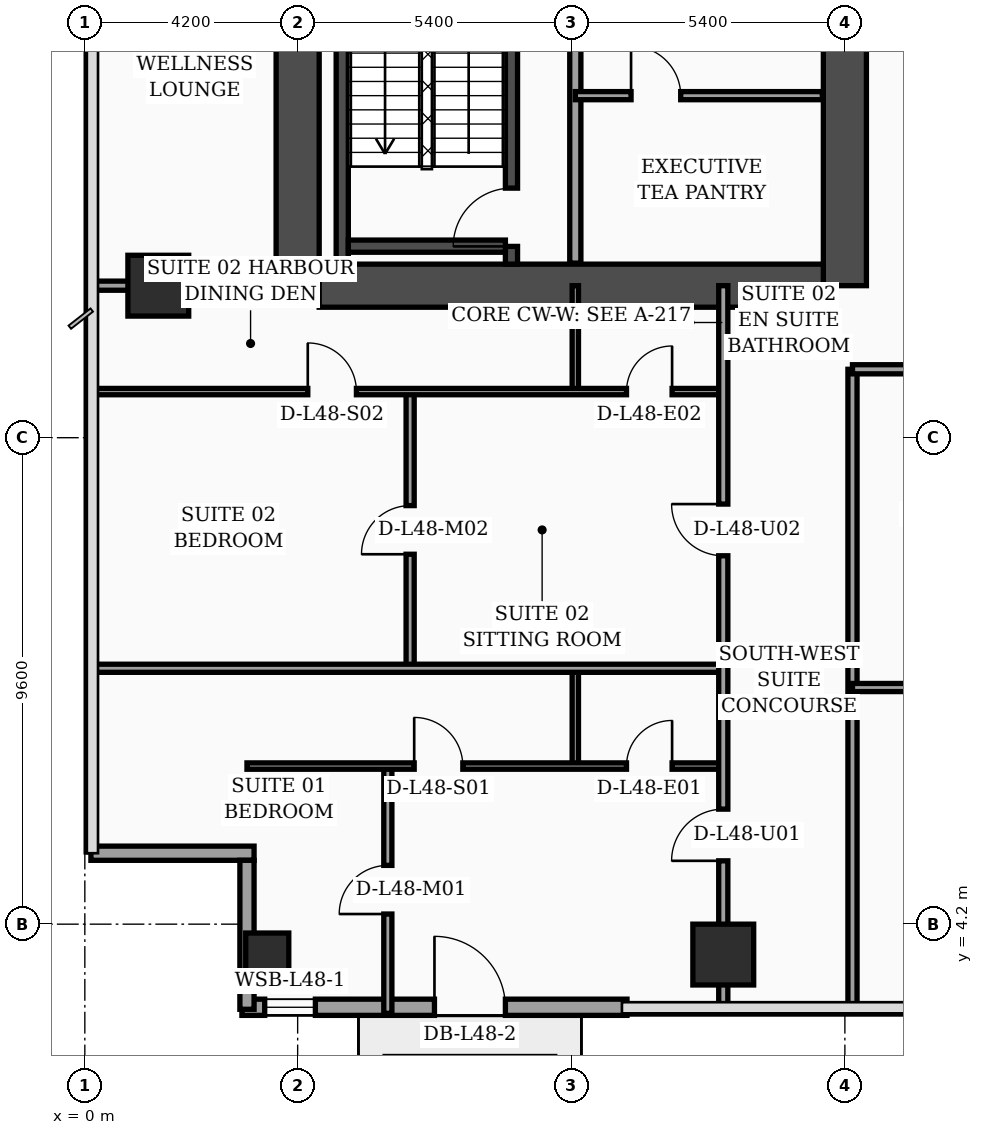
"""IFC4 building model, lengths in metres.
Left out: names, types, materials, properties, quantities, classifications, styles, units other than length and angle.
Written with IfcOpenShell. Run it as: python <this file> out.ifc"""

import sys

from ifc_helpers import new_model, si_unit, direction, frame, frame_2d, origin, origin_2d, place, context, subcontext, project, spatial, rectangle, hollow_rectangle, extrude, element, fill, save


model = new_model("IFC4")
c1 = context("Model", 3, precision=1e-05, world=origin(), true_north=direction((0.0, 1.0)))
c2 = subcontext(c1, "Body", "Model", "MODEL_VIEW")
j1 = project(units=[si_unit("LENGTHUNIT", "METRE"), si_unit("PLANEANGLEUNIT", "RADIAN")], contexts=[c1])
p1 = place(None, origin())
s1 = spatial("IfcSite", under=j1, at=p1, CompositionType="ELEMENT")
p2 = place(p1, origin())
s2 = spatial("IfcBuilding", under=s1, at=p2, CompositionType="ELEMENT")
p3 = place(p2, frame((0.0, 0.0, 195.1)))
s3 = spatial("IfcBuildingStorey", under=s2, at=p3, CompositionType="ELEMENT", Elevation=195.1)
p4 = place(p3, frame((4.2, 16.8, 0.0), z_axis=(0.0, 0.0, 1.0), x_axis=(0.0, 1.0, 0.0)))
e1 = element("IfcWall", 1, at=p4, inside=s3, PredefinedType="SHEAR", context=c2, shape_type="SweptSolid", body=[
    extrude(rectangle(XDim=21.6, YDim=0.85, at=frame_2d((10.8, 0.0))), origin(), (0.0, 0.0, 1.0), 4.05),
])
p5 = place(p3, frame((15.0, 16.8, 0.0), z_axis=(0.0, 0.0, 1.0), x_axis=(0.0, 1.0, 0.0)))
e2 = element("IfcWall", 2, at=p5, inside=s3, PredefinedType="SHEAR", context=c2, shape_type="SweptSolid", body=[
    extrude(rectangle(XDim=21.6, YDim=0.85, at=frame_2d((10.8, 0.0))), origin(), (0.0, 0.0, 1.0), 4.05),
])
p6 = place(p5, frame((8.65, 0.0, 0.0)))
e3 = element("IfcOpeningElement", 3, at=p6, cuts=e2, PredefinedType="OPENING", context=c2, shape_type="SweptSolid", body=[
    extrude(rectangle(XDim=1.1, YDim=2.2, at=frame_2d((0.55, 1.1))), frame((0.0, 0.435, 0.0), z_axis=(0.0, -1.0, 0.0), x_axis=(1.0, 0.0, 0.0)), (0.0, 0.0, 1.0), 0.87),
])
p7 = place(p5, frame((10.85, 0.0, 0.0)))
e4 = element("IfcOpeningElement", 4, at=p7, cuts=e2, PredefinedType="OPENING", context=c2, shape_type="SweptSolid", body=[
    extrude(rectangle(XDim=1.1, YDim=2.2, at=frame_2d((0.55, 1.1))), frame((0.0, 0.435, 0.0), z_axis=(0.0, -1.0, 0.0), x_axis=(1.0, 0.0, 0.0)), (0.0, 0.0, 1.0), 0.87),
])
p8 = place(p5, frame((13.5, 0.0, 0.0)))
e5 = element("IfcOpeningElement", 5, at=p8, cuts=e2, PredefinedType="OPENING", context=c2, shape_type="SweptSolid", body=[
    extrude(rectangle(XDim=1.1, YDim=2.2, at=frame_2d((0.55, 1.1))), frame((0.0, 0.435, 0.0), z_axis=(0.0, -1.0, 0.0), x_axis=(1.0, 0.0, 0.0)), (0.0, 0.0, 1.0), 0.87),
])
p9 = place(p5, frame((16.15, 0.0, 0.0)))
e6 = element("IfcOpeningElement", 6, at=p9, cuts=e2, PredefinedType="OPENING", context=c2, shape_type="SweptSolid", body=[
    extrude(rectangle(XDim=1.1, YDim=2.2, at=frame_2d((0.55, 1.1))), frame((0.0, 0.435, 0.0), z_axis=(0.0, -1.0, 0.0), x_axis=(1.0, 0.0, 0.0)), (0.0, 0.0, 1.0), 0.87),
])
p10 = place(p3, frame((4.625, 16.8, 0.0), z_axis=(0.0, 0.0, 1.0), x_axis=(1.0, 0.0, 0.0)))
e7 = element("IfcWall", 7, at=p10, inside=s3, PredefinedType="SHEAR", context=c2, shape_type="SweptSolid", body=[
    extrude(rectangle(XDim=9.95, YDim=0.85, at=frame_2d((4.975, 0.0))), origin(), (0.0, 0.0, 1.0), 4.05),
])
p11 = place(p3, frame((5.08, 17.225, 0.0), z_axis=(0.0, 0.0, 1.0), x_axis=(0.0, 1.0, 0.0)))
e8 = element("IfcWall", 8, at=p11, inside=s3, PredefinedType="SOLIDWALL", context=c2, shape_type="SweptSolid", body=[
    extrude(rectangle(XDim=9.565, YDim=0.24, at=frame_2d((4.782, 0.0))), origin(), (0.0, 0.0, 1.0), 4.05),
])
p12 = place(p3, frame((8.42, 17.225, 0.0), z_axis=(0.0, 0.0, 1.0), x_axis=(0.0, 1.0, 0.0)))
e9 = element("IfcWall", 9, at=p12, inside=s3, PredefinedType="SOLIDWALL", context=c2, shape_type="SweptSolid", body=[
    extrude(rectangle(XDim=9.565, YDim=0.24, at=frame_2d((4.782, 0.0))), origin(), (0.0, 0.0, 1.0), 4.05),
])
p13 = place(p12, frame((0.35, 0.0, 0.0)))
e10 = element("IfcOpeningElement", 10, at=p13, cuts=e9, PredefinedType="OPENING", context=c2, shape_type="SweptSolid", body=[
    extrude(rectangle(XDim=1.15, YDim=2.2, at=frame_2d((0.575, 1.1))), frame((0.0, 0.13, 0.0), z_axis=(0.0, -1.0, 0.0), x_axis=(1.0, 0.0, 0.0)), (0.0, 0.0, 1.0), 0.26),
])
p14 = place(p3, frame((5.2, 17.58, 0.0), z_axis=(0.0, 0.0, 1.0), x_axis=(1.0, 0.0, 0.0)))
e11 = element("IfcWall", 11, at=p14, inside=s3, PredefinedType="SOLIDWALL", context=c2, shape_type="SweptSolid", body=[
    extrude(rectangle(XDim=3.1, YDim=0.24, at=frame_2d((1.55, 0.0))), origin(), (0.0, 0.0, 1.0), 4.05),
])
p15 = place(p3, frame((3.6, 3.6, 0.0), z_axis=(0.0, 0.0, 1.0), x_axis=(1.0, 0.0, 0.0)))
e12 = element("IfcColumn", 12, at=p15, inside=s3, PredefinedType="COLUMN", context=c2, shape_type="SweptSolid", body=[
    extrude(hollow_rectangle(XDim=0.85, YDim=0.85, WallThickness=0.036, at=origin_2d()), origin(), (0.0, 0.0, 1.0), 4.05),
])
for number, where, z_axis, x_axis in (
    (13, (1.45, 16.8, 0.0), (0.0, 0.0, 1.0), (1.0, 0.0, 0.0)),
    (14, (12.6, 3.6, 0.0), (0.0, 0.0, 1.0), (1.0, 0.0, 0.0)),
):
    element("IfcColumn", number, at=place(p3, frame(where, z_axis=z_axis, x_axis=x_axis)), inside=s3, PredefinedType="COLUMN", context=c2, shape_type="SweptSolid", body=[
        extrude(rectangle(XDim=1.2, YDim=1.2, at=origin_2d()), origin(), (0.0, 0.0, 1.0), 4.05),
    ])
p16 = place(p3, frame((3.1, 2.56, 0.0), z_axis=(0.0, 0.0, 1.0), x_axis=(1.0, 0.0, 0.0)))
e15 = element("IfcWall", 15, at=p16, inside=s3, PredefinedType="SOLIDWALL", context=c2, shape_type="SweptSolid", body=[
    extrude(rectangle(XDim=7.6, YDim=0.32, at=frame_2d((3.8, 0.0))), origin(), (0.0, 0.0, 1.0), 4.05),
])
p17 = place(p16, frame((0.45, 0.0, 0.75)))
e16 = element("IfcOpeningElement", 16, at=p17, cuts=e15, PredefinedType="OPENING", context=c2, shape_type="SweptSolid", body=[
    extrude(rectangle(XDim=1.0, YDim=1.6, at=frame_2d((0.5, 0.8))), frame((0.0, 0.17, 0.0), z_axis=(0.0, -1.0, 0.0), x_axis=(1.0, 0.0, 0.0)), (0.0, 0.0, 1.0), 0.34),
])
p18 = place(p16, frame((3.8, 0.0, 0.0)))
e17 = element("IfcOpeningElement", 17, at=p18, cuts=e15, PredefinedType="OPENING", context=c2, shape_type="SweptSolid", body=[
    extrude(rectangle(XDim=1.4, YDim=2.25, at=frame_2d((0.7, 1.125))), frame((0.0, 0.17, 0.0), z_axis=(0.0, -1.0, 0.0), x_axis=(1.0, 0.0, 0.0)), (0.0, 0.0, 1.0), 0.34),
])
p19 = place(p3, frame((0.12, 5.6, 0.0), z_axis=(0.0, 0.0, 1.0), x_axis=(1.0, 0.0, 0.0)))
e18 = element("IfcWall", 18, at=p19, inside=s3, PredefinedType="SOLIDWALL", context=c2, shape_type="SweptSolid", body=[
    extrude(rectangle(XDim=3.22, YDim=0.28, at=frame_2d((1.61, 0.0))), origin(), (0.0, 0.0, 1.0), 3.45),
])
p20 = place(p3, frame((3.2, 5.46, 0.0), z_axis=(0.0, 0.0, 1.0), x_axis=(0.0, -1.0, 0.0)))
e19 = element("IfcWall", 19, at=p20, inside=s3, PredefinedType="SOLIDWALL", context=c2, shape_type="SweptSolid", body=[
    extrude(rectangle(XDim=2.94, YDim=0.28, at=frame_2d((1.47, 0.0))), origin(), (0.0, 0.0, 1.0), 2.35),
])
p21 = place(p3, frame((9.68, 17.245, 0.0), z_axis=(0.0, 0.0, 1.0), x_axis=(0.0, 1.0, 0.0)))
e20 = element("IfcWall", 20, at=p21, inside=s3, PredefinedType="SOLIDWALL", context=c2, shape_type="SweptSolid", body=[
    extrude(rectangle(XDim=7.755, YDim=0.22, at=frame_2d((3.877, 0.0))), origin(), (0.0, 0.0, 1.0), 4.05),
])
p22 = place(p3, frame((9.68, 20.55, 0.0), z_axis=(0.0, 0.0, 1.0), x_axis=(1.0, 0.0, 0.0)))
e21 = element("IfcWall", 21, at=p22, inside=s3, PredefinedType="PARTITIONING", context=c2, shape_type="SweptSolid", body=[
    extrude(rectangle(XDim=4.875, YDim=0.16, at=frame_2d((2.438, 0.0))), origin(), (0.0, 0.0, 1.0), 4.05),
])
p23 = place(p22, frame((1.1, 0.0, 0.0)))
e22 = element("IfcOpeningElement", 22, at=p23, cuts=e21, PredefinedType="OPENING", context=c2, shape_type="SweptSolid", body=[
    extrude(rectangle(XDim=0.98, YDim=2.15, at=frame_2d((0.49, 1.075))), frame((0.0, 0.09, 0.0), z_axis=(0.0, -1.0, 0.0), x_axis=(1.0, 0.0, 0.0)), (0.0, 0.0, 1.0), 0.18),
])
p24 = place(p3, frame((0.08, 16.8, 0.0), z_axis=(0.0, 0.0, 1.0), x_axis=(1.0, 0.0, 0.0)))
e23 = element("IfcWall", 23, at=p24, inside=s3, PredefinedType="PARTITIONING", context=c2, shape_type="SweptSolid", body=[
    extrude(rectangle(XDim=3.725, YDim=0.18, at=frame_2d((1.862, 0.0))), origin(), (0.0, 0.0, 1.0), 3.45),
])
p25 = place(p3, frame((9.68, 7.32, 0.0), z_axis=(0.0, 0.0, 1.0), x_axis=(0.0, 1.0, 0.0)))
e24 = element("IfcWall", 24, at=p25, inside=s3, PredefinedType="PARTITIONING", context=c2, shape_type="SweptSolid", body=[
    extrude(rectangle(XDim=1.93, YDim=0.125, at=frame_2d((0.965, 0.0))), origin(), (0.0, 0.0, 1.0), 3.6),
])
p26 = place(p3, frame((5.98, 2.44, 0.0), z_axis=(0.0, 0.0, 1.0), x_axis=(0.0, 1.0, 0.0)))
e25 = element("IfcWall", 25, at=p26, inside=s3, PredefinedType="PARTITIONING", context=c2, shape_type="SweptSolid", body=[
    extrude(rectangle(XDim=4.88, YDim=0.16, at=frame_2d((2.44, 0.0))), origin(), (0.0, 0.0, 1.0), 2.35),
])
p27 = place(p26, frame((1.96, 0.0, 0.0)))
e26 = element("IfcOpeningElement", 26, at=p27, cuts=e25, PredefinedType="OPENING", context=c2, shape_type="SweptSolid", body=[
    extrude(rectangle(XDim=0.96, YDim=2.2, at=frame_2d((0.48, 1.1))), frame((0.0, 0.09, 0.0), z_axis=(0.0, -1.0, 0.0), x_axis=(1.0, 0.0, 0.0)), (0.0, 0.0, 1.0), 0.18),
])
p28 = place(p3, frame((3.2, 7.32, 0.0), z_axis=(0.0, 0.0, 1.0), x_axis=(1.0, 0.0, 0.0)))
e27 = element("IfcWall", 27, at=p28, inside=s3, PredefinedType="PARTITIONING", context=c2, shape_type="SweptSolid", body=[
    extrude(rectangle(XDim=9.4, YDim=0.125, at=frame_2d((4.7, 0.0))), origin(), (0.0, 0.0, 1.0), 3.45),
])
p29 = place(p28, frame((3.3, 0.0, 0.0)))
e28 = element("IfcOpeningElement", 28, at=p29, cuts=e27, PredefinedType="OPENING", context=c2, shape_type="SweptSolid", body=[
    extrude(rectangle(XDim=0.96, YDim=2.2, at=frame_2d((0.48, 1.1))), frame((0.0, 0.073, 0.0), z_axis=(0.0, -1.0, 0.0), x_axis=(1.0, 0.0, 0.0)), (0.0, 0.0, 1.0), 0.145),
])
p30 = place(p28, frame((7.49, 0.0, 0.0)))
e29 = element("IfcOpeningElement", 29, at=p30, cuts=e27, PredefinedType="OPENING", context=c2, shape_type="SweptSolid", body=[
    extrude(rectangle(XDim=0.9, YDim=2.15, at=frame_2d((0.45, 1.075))), frame((0.0, 0.073, 0.0), z_axis=(0.0, -1.0, 0.0), x_axis=(1.0, 0.0, 0.0)), (0.0, 0.0, 1.0), 0.145),
])
p31 = place(p3, frame((9.68, 14.71, 0.0), z_axis=(0.0, 0.0, 1.0), x_axis=(0.0, 1.0, 0.0)))
e30 = element("IfcWall", 30, at=p31, inside=s3, PredefinedType="PARTITIONING", context=c2, shape_type="SweptSolid", body=[
    extrude(rectangle(XDim=2.09, YDim=0.125, at=frame_2d((1.045, 0.0))), origin(), (0.0, 0.0, 1.0), 4.05),
])
p32 = place(p3, frame((6.42, 9.25, 0.0), z_axis=(0.0, 0.0, 1.0), x_axis=(0.0, 1.0, 0.0)))
e31 = element("IfcWall", 31, at=p32, inside=s3, PredefinedType="PARTITIONING", context=c2, shape_type="SweptSolid", body=[
    extrude(rectangle(XDim=5.46, YDim=0.16, at=frame_2d((2.73, 0.0))), origin(), (0.0, 0.0, 1.0), 3.65),
])
p33 = place(p32, frame((2.25, 0.0, 0.0)))
e32 = element("IfcOpeningElement", 32, at=p33, cuts=e31, PredefinedType="OPENING", context=c2, shape_type="SweptSolid", body=[
    extrude(rectangle(XDim=0.96, YDim=2.2, at=frame_2d((0.48, 1.1))), frame((0.0, 0.09, 0.0), z_axis=(0.0, -1.0, 0.0), x_axis=(1.0, 0.0, 0.0)), (0.0, 0.0, 1.0), 0.18),
])
p34 = place(p3, frame((0.08, 14.71, 0.0), z_axis=(0.0, 0.0, 1.0), x_axis=(1.0, 0.0, 0.0)))
e33 = element("IfcWall", 33, at=p34, inside=s3, PredefinedType="PARTITIONING", context=c2, shape_type="SweptSolid", body=[
    extrude(rectangle(XDim=12.52, YDim=0.125, at=frame_2d((6.26, 0.0))), origin(), (0.0, 0.0, 1.0), 3.45),
])
p35 = place(p34, frame((4.32, 0.0, 0.0)))
e34 = element("IfcOpeningElement", 34, at=p35, cuts=e33, PredefinedType="OPENING", context=c2, shape_type="SweptSolid", body=[
    extrude(rectangle(XDim=0.96, YDim=2.2, at=frame_2d((0.48, 1.1))), frame((0.0, 0.073, 0.0), z_axis=(0.0, -1.0, 0.0), x_axis=(1.0, 0.0, 0.0)), (0.0, 0.0, 1.0), 0.145),
])
p36 = place(p34, frame((10.61, 0.0, 0.0)))
e35 = element("IfcOpeningElement", 35, at=p36, cuts=e33, PredefinedType="OPENING", context=c2, shape_type="SweptSolid", body=[
    extrude(rectangle(XDim=0.9, YDim=2.15, at=frame_2d((0.45, 1.075))), frame((0.0, 0.073, 0.0), z_axis=(0.0, -1.0, 0.0), x_axis=(1.0, 0.0, 0.0)), (0.0, 0.0, 1.0), 0.145),
])
p37 = place(p3, frame((0.08, 9.25, 0.0), z_axis=(0.0, 0.0, 1.0), x_axis=(1.0, 0.0, 0.0)))
e36 = element("IfcWall", 36, at=p37, inside=s3, PredefinedType="PARTITIONING", context=c2, shape_type="SweptSolid", body=[
    extrude(rectangle(XDim=12.52, YDim=0.16, at=frame_2d((6.26, 0.0))), origin(), (0.0, 0.0, 1.0), 3.45),
])
p38 = place(p3, frame((12.6, 2.44, 0.0), z_axis=(0.0, 0.0, 1.0), x_axis=(0.0, 1.0, 0.0)))
e37 = element("IfcWall", 37, at=p38, inside=s3, PredefinedType="PARTITIONING", context=c2, shape_type="SweptSolid", body=[
    extrude(rectangle(XDim=14.36, YDim=0.18, at=frame_2d((7.18, 0.0))), origin(), (0.0, 0.0, 1.0), 2.35),
])
p39 = place(p38, frame((3.01, 0.0, 0.0)))
e38 = element("IfcOpeningElement", 38, at=p39, cuts=e37, PredefinedType="OPENING", context=c2, shape_type="SweptSolid", body=[
    extrude(rectangle(XDim=1.02, YDim=2.2, at=frame_2d((0.51, 1.1))), frame((0.0, 0.1, 0.0), z_axis=(0.0, -1.0, 0.0), x_axis=(1.0, 0.0, 0.0)), (0.0, 0.0, 1.0), 0.2),
])
p40 = place(p38, frame((9.03, 0.0, 0.0)))
e39 = element("IfcOpeningElement", 39, at=p40, cuts=e37, PredefinedType="OPENING", context=c2, shape_type="SweptSolid", body=[
    extrude(rectangle(XDim=1.02, YDim=2.2, at=frame_2d((0.51, 1.1))), frame((0.0, 0.1, 0.0), z_axis=(0.0, -1.0, 0.0), x_axis=(1.0, 0.0, 0.0)), (0.0, 0.0, 1.0), 0.2),
])
p41 = place(p3, frame((15.15, 2.44, 0.0), z_axis=(0.0, 0.0, 1.0), x_axis=(0.0, 1.0, 0.0)))
e40 = element("IfcWall", 40, at=p41, inside=s3, PredefinedType="PARTITIONING", context=c2, shape_type="SweptSolid", body=[
    extrude(rectangle(XDim=12.71, YDim=0.18, at=frame_2d((6.355, 0.0))), origin(), (0.0, 0.0, 1.0), 2.35),
])
p42 = place(p3, frame((15.15, 8.87, 0.0), z_axis=(0.0, 0.0, 1.0), x_axis=(1.0, 0.0, 0.0)))
e41 = element("IfcWall", 41, at=p42, inside=s3, PredefinedType="PARTITIONING", context=c2, shape_type="SweptSolid", body=[
    extrude(rectangle(XDim=4.45, YDim=0.16, at=frame_2d((2.225, 0.0))), origin(), (0.0, 0.0, 1.0), 4.05),
])
p43 = place(p42, frame((1.75, 0.0, 0.0)))
e42 = element("IfcOpeningElement", 42, at=p43, cuts=e41, PredefinedType="OPENING", context=c2, shape_type="SweptSolid", body=[
    extrude(rectangle(XDim=0.96, YDim=2.2, at=frame_2d((0.48, 1.1))), frame((0.0, 0.09, 0.0), z_axis=(0.0, -1.0, 0.0), x_axis=(1.0, 0.0, 0.0)), (0.0, 0.0, 1.0), 0.18),
])
p44 = place(p3, frame((15.15, 15.15, 0.0), z_axis=(0.0, 0.0, 1.0), x_axis=(1.0, 0.0, 0.0)))
e43 = element("IfcWall", 43, at=p44, inside=s3, PredefinedType="PARTITIONING", context=c2, shape_type="SweptSolid", body=[
    extrude(rectangle(XDim=6.45, YDim=0.18, at=frame_2d((3.225, 0.0))), origin(), (0.0, 0.0, 1.0), 2.35),
])
p45 = place(p44, frame((1.74, 0.0, 0.0)))
e44 = element("IfcOpeningElement", 44, at=p45, cuts=e43, PredefinedType="OPENING", context=c2, shape_type="SweptSolid", body=[
    extrude(rectangle(XDim=1.02, YDim=2.2, at=frame_2d((0.51, 1.1))), frame((0.0, 0.1, 0.0), z_axis=(0.0, -1.0, 0.0), x_axis=(1.0, 0.0, 0.0)), (0.0, 0.0, 1.0), 0.2),
])
p46 = place(p17, origin())
e45 = element("IfcWindow", 45, at=p46, inside=s3, PartitioningType="SINGLE_PANEL", PredefinedType="WINDOW", context=c2, shape_type="SweptSolid", body=[
    extrude(rectangle(XDim=1.0, YDim=1.6, at=frame_2d((0.5, 0.8))), frame((0.0, 0.03, 0.0), z_axis=(0.0, -1.0, 0.0), x_axis=(1.0, 0.0, 0.0)), (0.0, 0.0, 1.0), 0.06),
])
fill(e16, e45)
p47 = place(p18, origin())
e46 = element("IfcDoor", 46, at=p47, inside=s3, OperationType="SINGLE_SWING_LEFT", PredefinedType="DOOR", context=c2, shape_type="SweptSolid", body=[
    extrude(rectangle(XDim=1.4, YDim=2.25, at=frame_2d((0.7, 1.125))), frame((0.0, 0.025, 0.0), z_axis=(0.0, -1.0, 0.0), x_axis=(1.0, 0.0, 0.0)), (0.0, 0.0, 1.0), 0.05),
])
fill(e17, e46)
p48 = place(p23, origin())
e47 = element("IfcDoor", 47, at=p48, inside=s3, OperationType="SINGLE_SWING_LEFT", PredefinedType="DOOR", context=c2, shape_type="SweptSolid", body=[
    extrude(rectangle(XDim=0.98, YDim=2.15, at=frame_2d((0.49, 1.075))), frame((0.0, 0.025, 0.0), z_axis=(0.0, -1.0, 0.0), x_axis=(1.0, 0.0, 0.0)), (0.0, 0.0, 1.0), 0.05),
])
fill(e22, e47)
p49 = place(p27, origin())
e48 = element("IfcDoor", 48, at=p49, inside=s3, OperationType="SINGLE_SWING_LEFT", PredefinedType="DOOR", context=c2, shape_type="SweptSolid", body=[
    extrude(rectangle(XDim=0.96, YDim=2.2, at=frame_2d((0.48, 1.1))), frame((0.0, 0.025, 0.0), z_axis=(0.0, -1.0, 0.0), x_axis=(1.0, 0.0, 0.0)), (0.0, 0.0, 1.0), 0.05),
])
fill(e26, e48)
p50 = place(p29, origin())
e49 = element("IfcDoor", 49, at=p50, inside=s3, OperationType="SINGLE_SWING_LEFT", PredefinedType="DOOR", context=c2, shape_type="SweptSolid", body=[
    extrude(rectangle(XDim=0.96, YDim=2.2, at=frame_2d((0.48, 1.1))), frame((0.0, 0.025, 0.0), z_axis=(0.0, -1.0, 0.0), x_axis=(1.0, 0.0, 0.0)), (0.0, 0.0, 1.0), 0.05),
])
fill(e28, e49)
p51 = place(p30, origin())
e50 = element("IfcDoor", 50, at=p51, inside=s3, OperationType="SINGLE_SWING_RIGHT", PredefinedType="DOOR", context=c2, shape_type="SweptSolid", body=[
    extrude(rectangle(XDim=0.9, YDim=2.15, at=frame_2d((0.45, 1.075))), frame((0.0, 0.025, 0.0), z_axis=(0.0, -1.0, 0.0), x_axis=(1.0, 0.0, 0.0)), (0.0, 0.0, 1.0), 0.05),
])
fill(e29, e50)
p52 = place(p33, origin())
e51 = element("IfcDoor", 51, at=p52, inside=s3, OperationType="SINGLE_SWING_LEFT", PredefinedType="DOOR", context=c2, shape_type="SweptSolid", body=[
    extrude(rectangle(XDim=0.96, YDim=2.2, at=frame_2d((0.48, 1.1))), frame((0.0, 0.025, 0.0), z_axis=(0.0, -1.0, 0.0), x_axis=(1.0, 0.0, 0.0)), (0.0, 0.0, 1.0), 0.05),
])
fill(e32, e51)
p53 = place(p35, origin())
e52 = element("IfcDoor", 52, at=p53, inside=s3, OperationType="SINGLE_SWING_LEFT", PredefinedType="DOOR", context=c2, shape_type="SweptSolid", body=[
    extrude(rectangle(XDim=0.96, YDim=2.2, at=frame_2d((0.48, 1.1))), frame((0.0, 0.025, 0.0), z_axis=(0.0, -1.0, 0.0), x_axis=(1.0, 0.0, 0.0)), (0.0, 0.0, 1.0), 0.05),
])
fill(e34, e52)
p54 = place(p36, origin())
e53 = element("IfcDoor", 53, at=p54, inside=s3, OperationType="SINGLE_SWING_RIGHT", PredefinedType="DOOR", context=c2, shape_type="SweptSolid", body=[
    extrude(rectangle(XDim=0.9, YDim=2.15, at=frame_2d((0.45, 1.075))), frame((0.0, 0.025, 0.0), z_axis=(0.0, -1.0, 0.0), x_axis=(1.0, 0.0, 0.0)), (0.0, 0.0, 1.0), 0.05),
])
fill(e35, e53)
p55 = place(p39, origin())
e54 = element("IfcDoor", 54, at=p55, inside=s3, OperationType="SINGLE_SWING_LEFT", PredefinedType="DOOR", context=c2, shape_type="SweptSolid", body=[
    extrude(rectangle(XDim=1.02, YDim=2.2, at=frame_2d((0.51, 1.1))), frame((0.0, 0.025, 0.0), z_axis=(0.0, -1.0, 0.0), x_axis=(1.0, 0.0, 0.0)), (0.0, 0.0, 1.0), 0.05),
])
fill(e38, e54)
p56 = place(p40, origin())
e55 = element("IfcDoor", 55, at=p56, inside=s3, OperationType="SINGLE_SWING_RIGHT", PredefinedType="DOOR", context=c2, shape_type="SweptSolid", body=[
    extrude(rectangle(XDim=1.02, YDim=2.2, at=frame_2d((0.51, 1.1))), frame((0.0, 0.025, 0.0), z_axis=(0.0, -1.0, 0.0), x_axis=(1.0, 0.0, 0.0)), (0.0, 0.0, 1.0), 0.05),
])
fill(e39, e55)
p57 = place(p13, origin())
e56 = element("IfcDoor", 56, at=p57, inside=s3, OperationType="SINGLE_SWING_LEFT", PredefinedType="DOOR", context=c2, shape_type="SweptSolid", body=[
    extrude(rectangle(XDim=1.15, YDim=2.2, at=frame_2d((0.575, 1.1))), frame((0.0, 0.025, 0.0), z_axis=(0.0, -1.0, 0.0), x_axis=(1.0, 0.0, 0.0)), (0.0, 0.0, 1.0), 0.05),
])
fill(e10, e56)
save(model, sys.argv[1])
